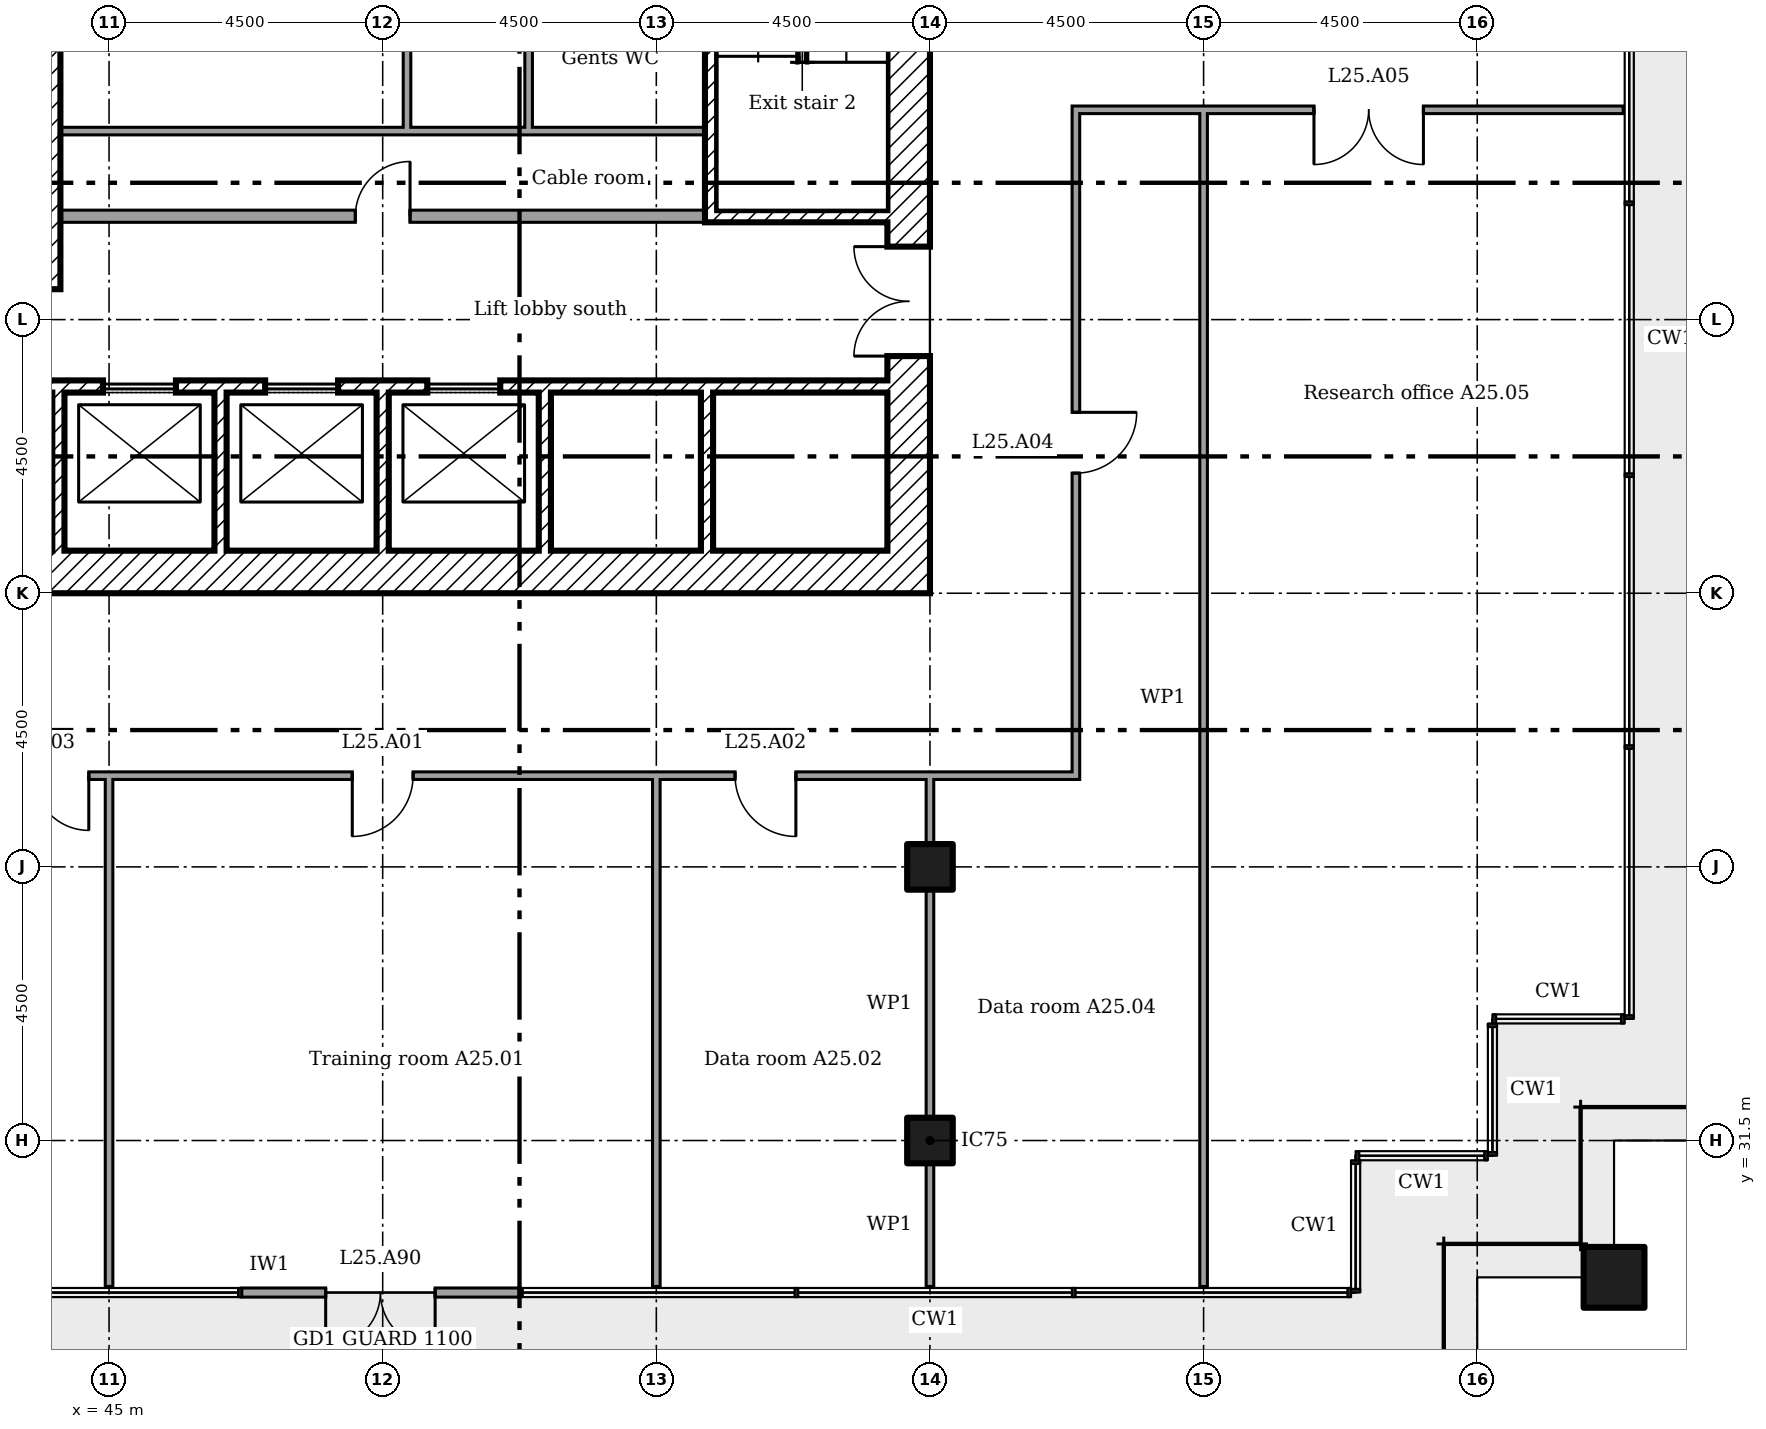
"""IFC4 building model, lengths in metres.
Left out: names, types, materials, properties, quantities, classifications, styles, units other than length and angle.
Written with IfcOpenShell. Run it as: python <this file> out.ifc"""

import sys

from ifc_helpers import new_model, si_unit, direction, frame, frame_2d, origin, origin_2d, place, context, subcontext, project, spatial, rectangle, extrude, element, fill, save


model = new_model("IFC4")
c1 = context("Model", 3, precision=1e-05, world=origin(), true_north=direction((0.0, 1.0)))
c2 = subcontext(c1, "Body", "Model", "MODEL_VIEW")
j1 = project(units=[si_unit("LENGTHUNIT", "METRE"), si_unit("PLANEANGLEUNIT", "RADIAN")], contexts=[c1])
p1 = place(None, origin())
s1 = spatial("IfcSite", under=j1, at=p1, CompositionType="ELEMENT")
p2 = place(p1, origin())
s2 = spatial("IfcBuilding", under=s1, at=p2, CompositionType="ELEMENT")
p3 = place(p2, frame((0.0, 0.0, 102.8)))
s3 = spatial("IfcBuildingStorey", under=s2, at=p3, CompositionType="ELEMENT", Elevation=102.8)
p4 = place(p3, frame((69.75, 29.25, 0.0)))
e1 = element("IfcColumn", 1, at=p4, inside=s3, PredefinedType="COLUMN", context=c2, shape_type="SweptSolid", body=[
    extrude(rectangle(XDim=1.0, YDim=1.0, at=origin_2d()), origin(), (0.0, 0.0, 1.0), 3.6),
])
for number, where in (
    (2, (58.5, 31.5, 0.0)),
    (3, (58.5, 36.0, 0.0)),
):
    element("IfcColumn", number, at=place(p3, frame(where)), inside=s3, PredefinedType="COLUMN", context=c2, shape_type="SweptSolid", body=[
        extrude(rectangle(XDim=0.75, YDim=0.75, at=origin_2d()), origin(), (0.0, 0.0, 1.0), 3.6),
    ])
p5 = place(p3, frame((47.182, 29.0, 0.0)))
e4 = element("IfcWall", 4, at=p5, inside=s3, PredefinedType="SOLIDWALL", context=c2, shape_type="SweptSolid", body=[
    extrude(rectangle(XDim=4.561, YDim=0.15, at=frame_2d((2.28, 0.0))), origin(), (0.0, 0.0, 1.0), 3.45),
])
p6 = place(p5, frame((1.38, 0.0, 0.0)))
e5 = element("IfcOpeningElement", 5, at=p6, cuts=e4, PredefinedType="OPENING", context=c2, shape_type="SweptSolid", body=[
    extrude(rectangle(XDim=1.8, YDim=2.4, at=frame_2d((0.9, 1.2))), frame((0.0, 0.085, 0.0), z_axis=(0.0, -1.0, 0.0), x_axis=(1.0, 0.0, 0.0)), (0.0, 0.0, 1.0), 0.17),
])
p7 = place(p3, frame((58.15, 40.5, 0.0), z_axis=(0.0, 0.0, 1.0), x_axis=(0.0, 1.0, 0.0)))
e6 = element("IfcWall", 6, at=p7, inside=s3, PredefinedType="SHEAR", context=c2, shape_type="SweptSolid", body=[
    extrude(rectangle(XDim=18.0, YDim=0.7, at=frame_2d((9.0, 0.0))), origin(), (0.0, 0.0, 1.0), 3.35),
])
p8 = place(p7, frame((13.15, 0.0, 0.0)))
e7 = element("IfcOpeningElement", 7, at=p8, cuts=e6, PredefinedType="OPENING", context=c2, shape_type="SweptSolid", body=[
    extrude(rectangle(XDim=1.2, YDim=2.1, at=frame_2d((0.6, 1.05))), frame((0.0, 0.36, 0.0), z_axis=(0.0, -1.0, 0.0), x_axis=(1.0, 0.0, 0.0)), (0.0, 0.0, 1.0), 0.72),
])
p9 = place(p7, frame((3.9, 0.0, 0.0)))
e8 = element("IfcOpeningElement", 8, at=p9, cuts=e6, PredefinedType="OPENING", context=c2, shape_type="SweptSolid", body=[
    extrude(rectangle(XDim=1.8, YDim=2.1, at=frame_2d((0.9, 1.05))), frame((0.0, 0.36, 0.0), z_axis=(0.0, -1.0, 0.0), x_axis=(1.0, 0.0, 0.0)), (0.0, 0.0, 1.0), 0.72),
])
p10 = place(p7, frame((11.525, 0.0, 0.0)))
e9 = element("IfcOpeningElement", 9, at=p10, cuts=e6, PredefinedType="OPENING", context=c2, shape_type="SweptSolid", body=[
    extrude(rectangle(XDim=1.0, YDim=2.1, at=frame_2d((0.5, 1.05))), frame((0.0, 0.36, 0.0), z_axis=(0.0, -1.0, 0.0), x_axis=(1.0, 0.0, 0.0)), (0.0, 0.0, 1.0), 0.72),
])
p11 = place(p3, frame((41.2, 40.85, 0.0)))
e10 = element("IfcWall", 10, at=p11, inside=s3, PredefinedType="SHEAR", context=c2, shape_type="SweptSolid", body=[
    extrude(rectangle(XDim=16.6, YDim=0.7, at=frame_2d((8.3, 0.0))), origin(), (0.0, 0.0, 1.0), 3.35),
])
for number, where, z_axis, x_axis in (
    (11, (44.167, 41.2, 0.0), (0.0, 0.0, 1.0), (0.0, 1.0, 0.0)),
    (12, (46.833, 41.2, 0.0), (0.0, 0.0, 1.0), (0.0, 1.0, 0.0)),
    (13, (49.5, 41.2, 0.0), (0.0, 0.0, 1.0), (0.0, 1.0, 0.0)),
    (14, (52.167, 41.2, 0.0), (0.0, 0.0, 1.0), (0.0, 1.0, 0.0)),
    (15, (54.833, 41.2, 0.0), (0.0, 0.0, 1.0), (0.0, 1.0, 0.0)),
):
    element("IfcWall", number, at=place(p3, frame(where, z_axis=z_axis, x_axis=x_axis)), inside=s3, PredefinedType="SHEAR", context=c2, shape_type="SweptSolid", body=[
        extrude(rectangle(XDim=2.6, YDim=0.2, at=frame_2d((1.3, 0.0))), origin(), (0.0, 0.0, 1.0), 3.35),
    ])
p12 = place(p3, frame((41.2, 43.9, 0.0)))
e16 = element("IfcWall", 16, at=p12, inside=s3, PredefinedType="SHEAR", context=c2, shape_type="SweptSolid", body=[
    extrude(rectangle(XDim=16.6, YDim=0.2, at=frame_2d((8.3, 0.0))), origin(), (0.0, 0.0, 1.0), 3.35),
])
p13 = place(p12, frame((1.033, 0.0, 0.0)))
e17 = element("IfcOpeningElement", 17, at=p13, cuts=e16, PredefinedType="OPENING", context=c2, shape_type="SweptSolid", body=[
    extrude(rectangle(XDim=1.2, YDim=2.1, at=frame_2d((0.6, 1.05))), frame((0.0, 0.11, 0.0), z_axis=(0.0, -1.0, 0.0), x_axis=(1.0, 0.0, 0.0)), (0.0, 0.0, 1.0), 0.22),
])
p14 = place(p12, frame((3.7, 0.0, 0.0)))
e18 = element("IfcOpeningElement", 18, at=p14, cuts=e16, PredefinedType="OPENING", context=c2, shape_type="SweptSolid", body=[
    extrude(rectangle(XDim=1.2, YDim=2.1, at=frame_2d((0.6, 1.05))), frame((0.0, 0.11, 0.0), z_axis=(0.0, -1.0, 0.0), x_axis=(1.0, 0.0, 0.0)), (0.0, 0.0, 1.0), 0.22),
])
p15 = place(p12, frame((6.367, 0.0, 0.0)))
e19 = element("IfcOpeningElement", 19, at=p15, cuts=e16, PredefinedType="OPENING", context=c2, shape_type="SweptSolid", body=[
    extrude(rectangle(XDim=1.2, YDim=2.1, at=frame_2d((0.6, 1.05))), frame((0.0, 0.11, 0.0), z_axis=(0.0, -1.0, 0.0), x_axis=(1.0, 0.0, 0.0)), (0.0, 0.0, 1.0), 0.22),
])
p16 = place(p12, frame((9.033, 0.0, 0.0)))
e20 = element("IfcOpeningElement", 20, at=p16, cuts=e16, PredefinedType="OPENING", context=c2, shape_type="SweptSolid", body=[
    extrude(rectangle(XDim=1.2, YDim=2.1, at=frame_2d((0.6, 1.05))), frame((0.0, 0.11, 0.0), z_axis=(0.0, -1.0, 0.0), x_axis=(1.0, 0.0, 0.0)), (0.0, 0.0, 1.0), 0.22),
])
p17 = place(p3, frame((44.1, 45.5, 0.0), z_axis=(0.0, 0.0, 1.0), x_axis=(0.0, 1.0, 0.0)))
e21 = element("IfcWall", 21, at=p17, inside=s3, PredefinedType="SHEAR", context=c2, shape_type="SweptSolid", body=[
    extrude(rectangle(XDim=6.9, YDim=0.2, at=frame_2d((3.45, 0.0))), origin(), (0.0, 0.0, 1.0), 3.35),
])
p18 = place(p3, frame((54.8, 46.7, 0.0)))
e22 = element("IfcWall", 22, at=p18, inside=s3, PredefinedType="SHEAR", context=c2, shape_type="SweptSolid", body=[
    extrude(rectangle(XDim=3.0, YDim=0.2, at=frame_2d((1.5, 0.0))), origin(), (0.0, 0.0, 1.0), 3.35),
])
p19 = place(p3, frame((54.9, 46.8, 0.0), z_axis=(0.0, 0.0, 1.0), x_axis=(0.0, 1.0, 0.0)))
e23 = element("IfcWall", 23, at=p19, inside=s3, PredefinedType="SHEAR", context=c2, shape_type="SweptSolid", body=[
    extrude(rectangle(XDim=6.5, YDim=0.2, at=frame_2d((3.25, 0.0))), origin(), (0.0, 0.0, 1.0), 3.35),
])
p20 = place(p3, frame((44.2, 46.7, 0.0)))
e24 = element("IfcWall", 24, at=p20, inside=s3, PredefinedType="PARTITIONING", context=c2, shape_type="SweptSolid", body=[
    extrude(rectangle(XDim=10.6, YDim=0.2, at=frame_2d((5.3, 0.0))), origin(), (0.0, 0.0, 1.0), 3.35),
])
p21 = place(p20, frame((4.85, 0.0, 0.0)))
e25 = element("IfcOpeningElement", 25, at=p21, cuts=e24, PredefinedType="OPENING", context=c2, shape_type="SweptSolid", body=[
    extrude(rectangle(XDim=0.9, YDim=2.1, at=frame_2d((0.45, 1.05))), frame((0.0, 0.11, 0.0), z_axis=(0.0, -1.0, 0.0), x_axis=(1.0, 0.0, 0.0)), (0.0, 0.0, 1.0), 0.22),
])
p22 = place(p3, frame((49.962, 48.1, 0.0), z_axis=(0.0, 0.0, 1.0), x_axis=(-1.0, 0.0, 0.0)))
e26 = element("IfcWall", 26, at=p22, inside=s3, PredefinedType="PARTITIONING", context=c2, shape_type="SweptSolid", body=[
    extrude(rectangle(XDim=5.762, YDim=0.125, at=frame_2d((2.881, 0.0))), origin(), (0.0, 0.0, 1.0), 3.35),
])
p23 = place(p3, frame((51.962, 48.1, 0.0), z_axis=(0.0, 0.0, 1.0), x_axis=(-1.0, 0.0, 0.0)))
e27 = element("IfcWall", 27, at=p23, inside=s3, PredefinedType="PARTITIONING", context=c2, shape_type="SweptSolid", body=[
    extrude(rectangle(XDim=2.062, YDim=0.125, at=frame_2d((1.031, 0.0))), origin(), (0.0, 0.0, 1.0), 3.35),
])
p24 = place(p3, frame((49.9, 48.163, 0.0), z_axis=(0.0, 0.0, 1.0), x_axis=(0.0, 1.0, 0.0)))
e28 = element("IfcWall", 28, at=p24, inside=s3, PredefinedType="PARTITIONING", context=c2, shape_type="SweptSolid", body=[
    extrude(rectangle(XDim=3.637, YDim=0.125, at=frame_2d((1.819, 0.0))), origin(), (0.0, 0.0, 1.0), 3.35),
])
p25 = place(p3, frame((54.8, 48.1, 0.0), z_axis=(0.0, 0.0, 1.0), x_axis=(-1.0, 0.0, 0.0)))
e29 = element("IfcWall", 29, at=p25, inside=s3, PredefinedType="PARTITIONING", context=c2, shape_type="SweptSolid", body=[
    extrude(rectangle(XDim=2.9, YDim=0.125, at=frame_2d((1.45, 0.0))), origin(), (0.0, 0.0, 1.0), 3.35),
])
p26 = place(p3, frame((51.9, 48.163, 0.0), z_axis=(0.0, 0.0, 1.0), x_axis=(0.0, 1.0, 0.0)))
e30 = element("IfcWall", 30, at=p26, inside=s3, PredefinedType="PARTITIONING", context=c2, shape_type="SweptSolid", body=[
    extrude(rectangle(XDim=3.637, YDim=0.125, at=frame_2d((1.819, 0.0))), origin(), (0.0, 0.0, 1.0), 3.35),
])
p27 = place(p3, frame((42.438, 37.5, 0.0)))
e31 = element("IfcWall", 31, at=p27, inside=s3, PredefinedType="PARTITIONING", context=c2, shape_type="SweptSolid", body=[
    extrude(rectangle(XDim=18.525, YDim=0.125, at=frame_2d((9.262, 0.0))), origin(), (0.0, 0.0, 1.0), 3.45),
])
p28 = place(p27, frame((6.562, 0.0, 0.0)))
e32 = element("IfcOpeningElement", 32, at=p28, cuts=e31, PredefinedType="OPENING", context=c2, shape_type="SweptSolid", body=[
    extrude(rectangle(XDim=1.0, YDim=2.1, at=frame_2d((0.5, 1.05))), frame((0.0, 0.073, 0.0), z_axis=(0.0, -1.0, 0.0), x_axis=(1.0, 0.0, 0.0)), (0.0, 0.0, 1.0), 0.145),
])
p29 = place(p27, frame((12.857, 0.0, 0.0)))
e33 = element("IfcOpeningElement", 33, at=p29, cuts=e31, PredefinedType="OPENING", context=c2, shape_type="SweptSolid", body=[
    extrude(rectangle(XDim=1.0, YDim=2.1, at=frame_2d((0.5, 1.05))), frame((0.0, 0.073, 0.0), z_axis=(0.0, -1.0, 0.0), x_axis=(1.0, 0.0, 0.0)), (0.0, 0.0, 1.0), 0.145),
])
p30 = place(p27, frame((0.429, 0.0, 0.0)))
e34 = element("IfcOpeningElement", 34, at=p30, cuts=e31, PredefinedType="OPENING", context=c2, shape_type="SweptSolid", body=[
    extrude(rectangle(XDim=1.8, YDim=2.1, at=frame_2d((0.9, 1.05))), frame((0.0, 0.073, 0.0), z_axis=(0.0, -1.0, 0.0), x_axis=(1.0, 0.0, 0.0)), (0.0, 0.0, 1.0), 0.145),
])
p31 = place(p3, frame((60.837, 48.45, 0.0)))
e35 = element("IfcWall", 35, at=p31, inside=s3, PredefinedType="PARTITIONING", context=c2, shape_type="SweptSolid", body=[
    extrude(rectangle(XDim=9.062, YDim=0.125, at=frame_2d((4.531, 0.0))), origin(), (0.0, 0.0, 1.0), 3.45),
])
p32 = place(p31, frame((3.978, 0.0, 0.0)))
e36 = element("IfcOpeningElement", 36, at=p32, cuts=e35, PredefinedType="OPENING", context=c2, shape_type="SweptSolid", body=[
    extrude(rectangle(XDim=1.8, YDim=2.1, at=frame_2d((0.9, 1.05))), frame((0.0, 0.073, 0.0), z_axis=(0.0, -1.0, 0.0), x_axis=(1.0, 0.0, 0.0)), (0.0, 0.0, 1.0), 0.145),
])
for number, where, z_axis, x_axis in (
    (37, (45.0, 29.1, 0.0), (0.0, 0.0, 1.0), (0.0, 1.0, 0.0)),
    (38, (54.0, 29.1, 0.0), (0.0, 0.0, 1.0), (0.0, 1.0, 0.0)),
):
    element("IfcWall", number, at=place(p3, frame(where, z_axis=z_axis, x_axis=x_axis)), inside=s3, PredefinedType="PARTITIONING", context=c2, shape_type="SweptSolid", body=[
        extrude(rectangle(XDim=8.4, YDim=0.125, at=frame_2d((4.2, 0.0))), origin(), (0.0, 0.0, 1.0), 2.766),
    ])
p33 = place(p3, frame((58.5, 29.1, 0.0), z_axis=(0.0, 0.0, 1.0), x_axis=(0.0, 1.0, 0.0)))
e39 = element("IfcWall", 39, at=p33, inside=s3, PredefinedType="PARTITIONING", context=c2, shape_type="SweptSolid", body=[
    extrude(rectangle(XDim=2.025, YDim=0.125, at=frame_2d((1.012, 0.0))), origin(), (0.0, 0.0, 1.0), 2.676),
])
p34 = place(p3, frame((58.5, 31.875, 0.0), z_axis=(0.0, 0.0, 1.0), x_axis=(0.0, 1.0, 0.0)))
e40 = element("IfcWall", 40, at=p34, inside=s3, PredefinedType="PARTITIONING", context=c2, shape_type="SweptSolid", body=[
    extrude(rectangle(XDim=3.75, YDim=0.125, at=frame_2d((1.875, 0.0))), origin(), (0.0, 0.0, 1.0), 2.676),
])
p35 = place(p3, frame((58.5, 36.375, 0.0), z_axis=(0.0, 0.0, 1.0), x_axis=(0.0, 1.0, 0.0)))
e41 = element("IfcWall", 41, at=p35, inside=s3, PredefinedType="PARTITIONING", context=c2, shape_type="SweptSolid", body=[
    extrude(rectangle(XDim=1.125, YDim=0.125, at=frame_2d((0.562, 0.0))), origin(), (0.0, 0.0, 1.0), 2.676),
])
p36 = place(p3, frame((60.9, 37.562, 0.0), z_axis=(0.0, 0.0, 1.0), x_axis=(0.0, 1.0, 0.0)))
e42 = element("IfcWall", 42, at=p36, inside=s3, PredefinedType="PARTITIONING", context=c2, shape_type="SweptSolid", body=[
    extrude(rectangle(XDim=10.825, YDim=0.125, at=frame_2d((5.413, 0.0))), origin(), (0.0, 0.0, 1.0), 3.45),
])
p37 = place(p36, frame((4.913, 0.0, 0.0)))
e43 = element("IfcOpeningElement", 43, at=p37, cuts=e42, PredefinedType="OPENING", context=c2, shape_type="SweptSolid", body=[
    extrude(rectangle(XDim=1.0, YDim=2.1, at=frame_2d((0.5, 1.05))), frame((0.0, 0.073, 0.0), z_axis=(0.0, -1.0, 0.0), x_axis=(1.0, 0.0, 0.0)), (0.0, 0.0, 1.0), 0.145),
])
p38 = place(p3, frame((63.0, 29.1, 0.0), z_axis=(0.0, 0.0, 1.0), x_axis=(0.0, 1.0, 0.0)))
e44 = element("IfcWall", 44, at=p38, inside=s3, PredefinedType="PARTITIONING", context=c2, shape_type="SweptSolid", body=[
    extrude(rectangle(XDim=19.35, YDim=0.125, at=frame_2d((9.675, 0.0))), origin(), (0.0, 0.0, 1.0), 3.45),
])
p39 = place(p6, frame((1.8, 0.0, 0.0), x_axis=(-1.0, 0.0, 0.0)))
e45 = element("IfcDoor", 45, at=p39, inside=s3, OperationType="DOUBLE_DOOR_DOUBLE_SWING", PredefinedType="NOTDEFINED", context=c2, shape_type="SweptSolid", body=[
    extrude(rectangle(XDim=1.8, YDim=2.4, at=frame_2d((0.9, 1.2))), frame((0.0, 0.025, 0.0), z_axis=(0.0, -1.0, 0.0), x_axis=(1.0, 0.0, 0.0)), (0.0, 0.0, 1.0), 0.05),
])
fill(e5, e45)
p40 = place(p9, origin())
e46 = element("IfcDoor", 46, at=p40, inside=s3, OperationType="DOUBLE_DOOR_SINGLE_SWING", PredefinedType="DOOR", context=c2, shape_type="SweptSolid", body=[
    extrude(rectangle(XDim=1.8, YDim=2.1, at=frame_2d((0.9, 1.05))), frame((0.0, 0.025, 0.0), z_axis=(0.0, -1.0, 0.0), x_axis=(1.0, 0.0, 0.0)), (0.0, 0.0, 1.0), 0.05),
])
fill(e8, e46)
p41 = place(p21, origin())
e47 = element("IfcDoor", 47, at=p41, inside=s3, OperationType="SINGLE_SWING_LEFT", PredefinedType="DOOR", context=c2, shape_type="SweptSolid", body=[
    extrude(rectangle(XDim=0.9, YDim=2.1, at=frame_2d((0.45, 1.05))), frame((0.0, 0.025, 0.0), z_axis=(0.0, -1.0, 0.0), x_axis=(1.0, 0.0, 0.0)), (0.0, 0.0, 1.0), 0.05),
])
fill(e25, e47)
p42 = place(p14, origin())
e48 = element("IfcDoor", 48, at=p42, inside=s3, OperationType="SLIDING_TO_LEFT", PredefinedType="DOOR", context=c2, shape_type="SweptSolid", body=[
    extrude(rectangle(XDim=1.2, YDim=2.1, at=frame_2d((0.6, 1.05))), frame((0.0, 0.025, 0.0), z_axis=(0.0, -1.0, 0.0), x_axis=(1.0, 0.0, 0.0)), (0.0, 0.0, 1.0), 0.05),
])
fill(e18, e48)
p43 = place(p15, origin())
e49 = element("IfcDoor", 49, at=p43, inside=s3, OperationType="SLIDING_TO_LEFT", PredefinedType="DOOR", context=c2, shape_type="SweptSolid", body=[
    extrude(rectangle(XDim=1.2, YDim=2.1, at=frame_2d((0.6, 1.05))), frame((0.0, 0.025, 0.0), z_axis=(0.0, -1.0, 0.0), x_axis=(1.0, 0.0, 0.0)), (0.0, 0.0, 1.0), 0.05),
])
fill(e19, e49)
p44 = place(p16, origin())
e50 = element("IfcDoor", 50, at=p44, inside=s3, OperationType="SLIDING_TO_LEFT", PredefinedType="DOOR", context=c2, shape_type="SweptSolid", body=[
    extrude(rectangle(XDim=1.2, YDim=2.1, at=frame_2d((0.6, 1.05))), frame((0.0, 0.025, 0.0), z_axis=(0.0, -1.0, 0.0), x_axis=(1.0, 0.0, 0.0)), (0.0, 0.0, 1.0), 0.05),
])
fill(e20, e50)
p45 = place(p28, frame((1.0, 0.0, 0.0), x_axis=(-1.0, 0.0, 0.0)))
e51 = element("IfcDoor", 51, at=p45, inside=s3, OperationType="SINGLE_SWING_LEFT", PredefinedType="DOOR", context=c2, shape_type="SweptSolid", body=[
    extrude(rectangle(XDim=1.0, YDim=2.1, at=frame_2d((0.5, 1.05))), frame((0.0, 0.025, 0.0), z_axis=(0.0, -1.0, 0.0), x_axis=(1.0, 0.0, 0.0)), (0.0, 0.0, 1.0), 0.05),
])
fill(e32, e51)
p46 = place(p29, frame((1.0, 0.0, 0.0), x_axis=(-1.0, 0.0, 0.0)))
e52 = element("IfcDoor", 52, at=p46, inside=s3, OperationType="SINGLE_SWING_RIGHT", PredefinedType="DOOR", context=c2, shape_type="SweptSolid", body=[
    extrude(rectangle(XDim=1.0, YDim=2.1, at=frame_2d((0.5, 1.05))), frame((0.0, 0.025, 0.0), z_axis=(0.0, -1.0, 0.0), x_axis=(1.0, 0.0, 0.0)), (0.0, 0.0, 1.0), 0.05),
])
fill(e33, e52)
p47 = place(p30, frame((1.8, 0.0, 0.0), x_axis=(-1.0, 0.0, 0.0)))
e53 = element("IfcDoor", 53, at=p47, inside=s3, OperationType="DOUBLE_DOOR_SINGLE_SWING", PredefinedType="DOOR", context=c2, shape_type="SweptSolid", body=[
    extrude(rectangle(XDim=1.8, YDim=2.1, at=frame_2d((0.9, 1.05))), frame((0.0, 0.025, 0.0), z_axis=(0.0, -1.0, 0.0), x_axis=(1.0, 0.0, 0.0)), (0.0, 0.0, 1.0), 0.05),
])
fill(e34, e53)
p48 = place(p37, frame((1.0, 0.0, 0.0), x_axis=(-1.0, 0.0, 0.0)))
e54 = element("IfcDoor", 54, at=p48, inside=s3, OperationType="SINGLE_SWING_RIGHT", PredefinedType="DOOR", context=c2, shape_type="SweptSolid", body=[
    extrude(rectangle(XDim=1.0, YDim=2.1, at=frame_2d((0.5, 1.05))), frame((0.0, 0.025, 0.0), z_axis=(0.0, -1.0, 0.0), x_axis=(1.0, 0.0, 0.0)), (0.0, 0.0, 1.0), 0.05),
])
fill(e43, e54)
p49 = place(p32, frame((1.8, 0.0, 0.0), x_axis=(-1.0, 0.0, 0.0)))
e55 = element("IfcDoor", 55, at=p49, inside=s3, OperationType="DOUBLE_DOOR_SINGLE_SWING", PredefinedType="DOOR", context=c2, shape_type="SweptSolid", body=[
    extrude(rectangle(XDim=1.8, YDim=2.1, at=frame_2d((0.9, 1.05))), frame((0.0, 0.025, 0.0), z_axis=(0.0, -1.0, 0.0), x_axis=(1.0, 0.0, 0.0)), (0.0, 0.0, 1.0), 0.05),
])
fill(e36, e55)
save(model, sys.argv[1])
